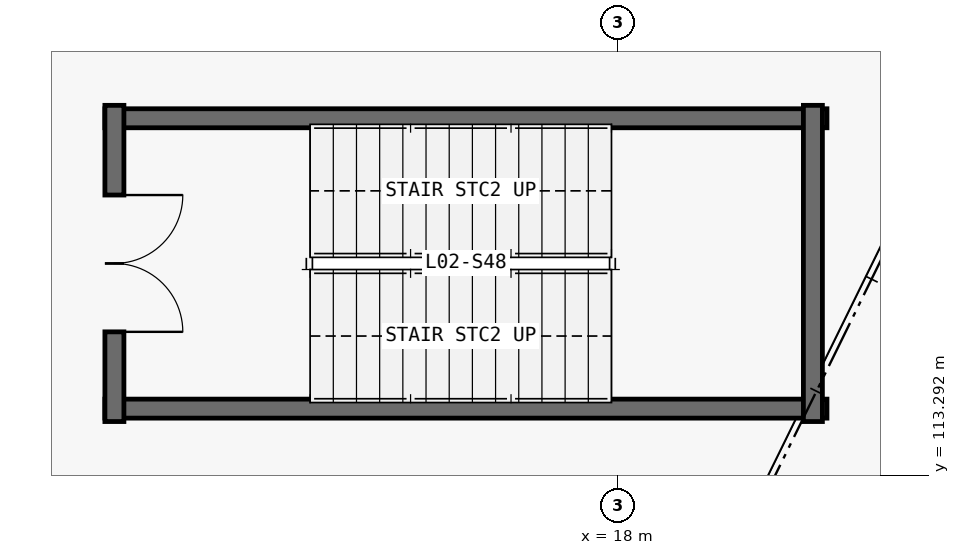
"""IFC4 building model, lengths in metres.
Left out: names, types, materials, properties, quantities, classifications, styles, units other than length and angle.
Written with IfcOpenShell. Run it as: python <this file> out.ifc"""

import sys

from ifc_helpers import new_model, si_unit, direction, frame, frame_2d, origin, place, context, subcontext, project, spatial, rectangle, extrude, element, fill, save


model = new_model("IFC4")
c1 = context("Model", 3, precision=1e-05, world=origin(), true_north=direction((0.0, 1.0)))
c2 = subcontext(c1, "Body", "Model", "MODEL_VIEW")
j1 = project(units=[si_unit("LENGTHUNIT", "METRE"), si_unit("PLANEANGLEUNIT", "RADIAN")], contexts=[c1])
p1 = place(None, origin())
s1 = spatial("IfcSite", under=j1, at=p1, CompositionType="ELEMENT")
p2 = place(p1, origin())
s2 = spatial("IfcBuilding", under=s1, at=p2, CompositionType="ELEMENT")
p3 = place(p2, frame((0.0, 0.0, 10.2)))
s3 = spatial("IfcBuildingStorey", under=s2, at=p3, CompositionType="ELEMENT", Elevation=10.2)
for number, where, z_axis, x_axis in (
    (1, (11.25, 114.17, 0.0), (0.0, 0.0, 1.0), (1.0, 0.0, 0.0)),
    (2, (20.75, 117.99, 0.0), (0.0, 0.0, 1.0), (-1.0, 0.0, 0.0)),
):
    element("IfcWall", number, at=place(p3, frame(where, z_axis=z_axis, x_axis=x_axis)), inside=s3, PredefinedType="SHEAR", context=c2, shape_type="SweptSolid", body=[
        extrude(rectangle(XDim=9.5, YDim=0.25, at=frame_2d((4.75, 0.0))), origin(), (0.0, 0.0, 1.0), 4.5),
    ])
p4 = place(p3, frame((11.375, 118.16, 0.0), z_axis=(0.0, 0.0, 1.0), x_axis=(0.0, -1.0, 0.0)))
e3 = element("IfcWall", 3, at=p4, inside=s3, PredefinedType="SHEAR", context=c2, shape_type="SweptSolid", body=[
    extrude(rectangle(XDim=4.16, YDim=0.25, at=frame_2d((2.08, 0.0))), origin(), (0.0, 0.0, 1.0), 4.5),
])
p5 = place(p4, frame((1.18, 0.0, 0.0)))
e4 = element("IfcOpeningElement", 4, at=p5, cuts=e3, PredefinedType="OPENING", context=c2, shape_type="SweptSolid", body=[
    extrude(rectangle(XDim=1.8, YDim=2.25, at=frame_2d((0.9, 1.125))), frame((0.0, 0.135, 0.0), z_axis=(0.0, -1.0, 0.0), x_axis=(1.0, 0.0, 0.0)), (0.0, 0.0, 1.0), 0.27),
])
p6 = place(p3, frame((20.565, 114.0, 0.0), z_axis=(0.0, 0.0, 1.0), x_axis=(0.0, 1.0, 0.0)))
e5 = element("IfcWall", 5, at=p6, inside=s3, PredefinedType="SHEAR", context=c2, shape_type="SweptSolid", body=[
    extrude(rectangle(XDim=4.16, YDim=0.25, at=frame_2d((2.08, 0.0))), origin(), (0.0, 0.0, 1.0), 4.5),
])
p7 = place(p5, origin())
e6 = element("IfcDoor", 6, at=p7, inside=s3, OperationType="DOUBLE_DOOR_SINGLE_SWING", PredefinedType="DOOR", context=c2, shape_type="SweptSolid", body=[
    extrude(rectangle(XDim=1.8, YDim=2.25, at=frame_2d((0.9, 1.125))), frame((0.0, 0.025, 0.0), z_axis=(0.0, -1.0, 0.0), x_axis=(1.0, 0.0, 0.0)), (0.0, 0.0, 1.0), 0.05),
])
fill(e4, e6)
save(model, sys.argv[1])
